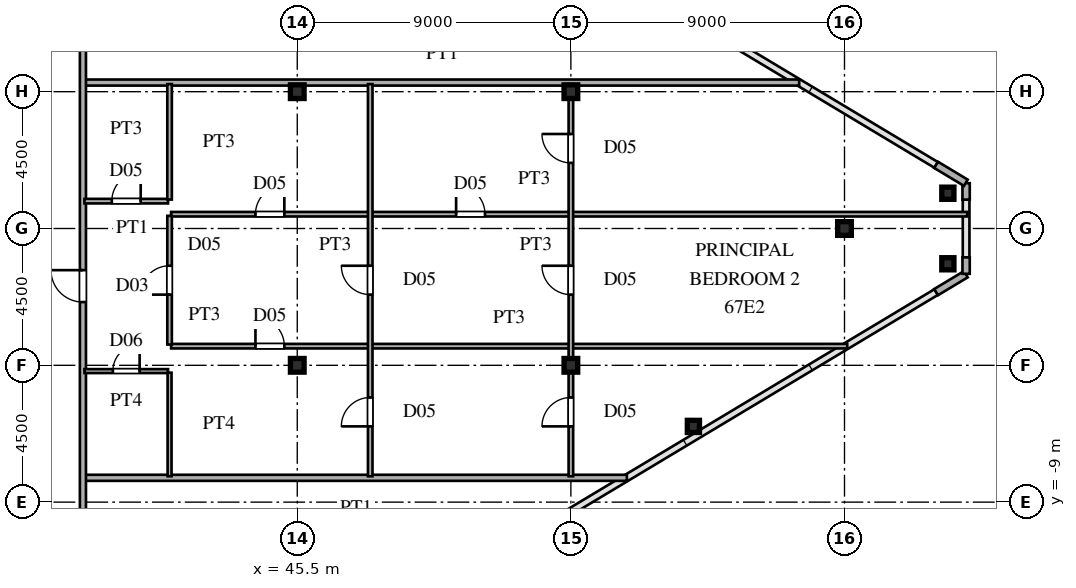
"""IFC4 building model, lengths in metres.
Left out: names, types, materials, properties, quantities, classifications, styles, units other than length and angle.
Written with IfcOpenShell. Run it as: python <this file> out.ifc"""

import sys

from ifc_helpers import new_model, si_unit, direction, frame, frame_2d, origin, origin_2d, place, context, subcontext, project, spatial, rectangle, hollow_rectangle, i_section, extrude, source, transform, mapped, element, fill, save


model = new_model("IFC4")
c1 = context("Model", 3, precision=1e-05, world=origin(), true_north=direction((0.0, 1.0)))
c2 = subcontext(c1, "Body", "Model", "MODEL_VIEW")
j1 = project(units=[si_unit("LENGTHUNIT", "METRE"), si_unit("PLANEANGLEUNIT", "RADIAN")], contexts=[c1])
p1 = place(None, origin())
s1 = spatial("IfcSite", under=j1, at=p1, CompositionType="ELEMENT")
p2 = place(p1, origin())
s2 = spatial("IfcBuilding", under=s1, at=p2, CompositionType="ELEMENT")
p3 = place(p2, frame((0.0, 0.0, 254.4)))
s3 = spatial("IfcBuildingStorey", under=s2, at=p3, CompositionType="ELEMENT", Elevation=254.4)
m1 = source(origin(), c2, "Body", "SweptSolid", [
    extrude(i_section(OverallWidth=0.45, OverallDepth=0.45, WebThickness=0.016, FlangeThickness=0.025, at=origin_2d()), origin(), (0.0, 0.0, 1.0), 3.75),
])
for number, where, z_axis, x_axis in (
    (1, (45.5, -4.5, 0.0), (0.0, 0.0, 1.0), (1.0, 0.0, 0.0)),
    (2, (45.5, 4.5, 0.0), (0.0, 0.0, 1.0), (1.0, 0.0, 0.0)),
    (3, (54.5, -4.5, 0.0), (0.0, 0.0, 1.0), (1.0, 0.0, 0.0)),
    (4, (54.5, 4.5, 0.0), (0.0, 0.0, 1.0), (1.0, 0.0, 0.0)),
    (5, (63.5, 0.0, 0.0), (0.0, 0.0, 1.0), (1.0, 0.0, 0.0)),
):
    element("IfcColumn", number, at=place(p3, frame(where, z_axis=z_axis, x_axis=x_axis)), inside=s3, PredefinedType="COLUMN", context=c2, shape_type="MappedRepresentation", body=[
        mapped(m1, transform((0.0, 0.0, 0.0), scale=1.0)),
    ])
m2 = source(origin(), c2, "Body", "SweptSolid", [
    extrude(hollow_rectangle(XDim=0.4, YDim=0.4, WallThickness=0.016, at=origin_2d()), origin(), (0.0, 0.0, 1.0), 3.75),
])
for number, where, z_axis, x_axis in (
    (6, (66.9, -1.16, 0.0), (0.0, 0.0, 1.0), (1.0, 0.0, 0.0)),
    (7, (66.9, 1.16, 0.0), (0.0, 0.0, 1.0), (1.0, 0.0, 0.0)),
    (8, (58.53, -6.509, 0.0), (0.0, 0.0, 1.0), (1.0, 0.0, 0.0)),
):
    element("IfcColumn", number, at=place(p3, frame(where, z_axis=z_axis, x_axis=x_axis)), inside=s3, PredefinedType="COLUMN", context=c2, shape_type="MappedRepresentation", body=[
        mapped(m2, transform((0.0, 0.0, 0.0), scale=1.0)),
    ])
p4 = place(p3, frame((66.514, -2.092, 0.0), z_axis=(0.0, 0.0, 1.0), x_axis=(0.85743623509, 0.514590228002, 0.0)))
e9 = element("IfcWall", 9, at=p4, inside=s3, PredefinedType="SOLIDWALL", context=c2, shape_type="SweptSolid", body=[
    extrude(rectangle(XDim=1.14, YDim=0.24, at=frame_2d((0.57, 0.0))), origin(), (0.0, 0.0, 1.0), 3.53),
])
for number, where, z_axis, x_axis in (
    (10, (67.5, -1.49, 0.0), (0.0, 0.0, 1.0), (0.0, 1.0, 0.0)),
    (11, (67.5, 0.95, 0.0), (0.0, 0.0, 1.0), (0.0, 1.0, 0.0)),
):
    element("IfcWall", number, at=place(p3, frame(where, z_axis=z_axis, x_axis=x_axis)), inside=s3, PredefinedType="SOLIDWALL", context=c2, shape_type="SweptSolid", body=[
        extrude(rectangle(XDim=0.54, YDim=0.24, at=frame_2d((0.27, 0.0))), origin(), (0.0, 0.0, 1.0), 3.53),
    ])
p5 = place(p3, frame((67.491, 1.505, 0.0), z_axis=(0.0, 0.0, 1.0), x_axis=(-0.85743623509, 0.514590228002, 0.0)))
e12 = element("IfcWall", 12, at=p5, inside=s3, PredefinedType="SOLIDWALL", context=c2, shape_type="SweptSolid", body=[
    extrude(rectangle(XDim=1.14, YDim=0.24, at=frame_2d((0.57, 0.0))), origin(), (0.0, 0.0, 1.0), 3.53),
])
p6 = place(p3, frame((38.53, -8.2, 0.0), z_axis=(0.0, 0.0, 1.0), x_axis=(1.0, 0.0, 0.0)))
e13 = element("IfcWall", 13, at=p6, inside=s3, PredefinedType="PARTITIONING", context=c2, shape_type="SweptSolid", body=[
    extrude(rectangle(XDim=17.813, YDim=0.2, at=frame_2d((8.906, 0.0))), origin(), (0.0, 0.0, 1.0), 3.53),
])
p7 = place(p3, frame((38.5, -4.69, 0.0), z_axis=(0.0, 0.0, 1.0), x_axis=(1.0, 0.0, 0.0)))
e14 = element("IfcWall", 14, at=p7, inside=s3, PredefinedType="PARTITIONING", context=c2, shape_type="SweptSolid", body=[
    extrude(rectangle(XDim=2.75, YDim=0.13, at=frame_2d((1.375, 0.0))), origin(), (0.0, 0.0, 1.0), 3.53),
])
p8 = place(p7, frame((0.935, 0.0, 0.0)))
e15 = element("IfcOpeningElement", 15, at=p8, cuts=e14, PredefinedType="OPENING", context=c2, shape_type="SweptSolid", body=[
    extrude(rectangle(XDim=0.88, YDim=2.1, at=frame_2d((0.44, 1.05))), frame((0.0, 0.075, 0.0), z_axis=(0.0, -1.0, 0.0), x_axis=(1.0, 0.0, 0.0)), (0.0, 0.0, 1.0), 0.15),
])
p9 = place(p3, frame((41.35, -3.87, 0.0), z_axis=(0.0, 0.0, 1.0), x_axis=(1.0, 0.0, 0.0)))
e16 = element("IfcWall", 16, at=p9, inside=s3, PredefinedType="PARTITIONING", context=c2, shape_type="SweptSolid", body=[
    extrude(rectangle(XDim=22.24, YDim=0.15, at=frame_2d((11.12, 0.0))), origin(), (0.0, 0.0, 1.0), 3.53),
])
p10 = place(p9, frame((2.775, 0.0, 0.0)))
e17 = element("IfcOpeningElement", 17, at=p10, cuts=e16, PredefinedType="OPENING", context=c2, shape_type="SweptSolid", body=[
    extrude(rectangle(XDim=0.95, YDim=2.15, at=frame_2d((0.475, 1.075))), frame((0.0, 0.085, 0.0), z_axis=(0.0, -1.0, 0.0), x_axis=(1.0, 0.0, 0.0)), (0.0, 0.0, 1.0), 0.17),
])
p11 = place(p3, frame((41.35, 0.47, 0.0), z_axis=(0.0, 0.0, 1.0), x_axis=(1.0, 0.0, 0.0)))
e18 = element("IfcWall", 18, at=p11, inside=s3, PredefinedType="PARTITIONING", context=c2, shape_type="SweptSolid", body=[
    extrude(rectangle(XDim=26.185, YDim=0.15, at=frame_2d((13.092, 0.0))), origin(), (0.0, 0.0, 1.0), 3.53),
])
p12 = place(p11, frame((2.775, 0.0, 0.0)))
e19 = element("IfcOpeningElement", 19, at=p12, cuts=e18, PredefinedType="OPENING", context=c2, shape_type="SweptSolid", body=[
    extrude(rectangle(XDim=0.95, YDim=2.15, at=frame_2d((0.475, 1.075))), frame((0.0, 0.085, 0.0), z_axis=(0.0, -1.0, 0.0), x_axis=(1.0, 0.0, 0.0)), (0.0, 0.0, 1.0), 0.17),
])
p13 = place(p11, frame((9.375, 0.0, 0.0)))
e20 = element("IfcOpeningElement", 20, at=p13, cuts=e18, PredefinedType="OPENING", context=c2, shape_type="SweptSolid", body=[
    extrude(rectangle(XDim=0.95, YDim=2.15, at=frame_2d((0.475, 1.075))), frame((0.0, 0.085, 0.0), z_axis=(0.0, -1.0, 0.0), x_axis=(1.0, 0.0, 0.0)), (0.0, 0.0, 1.0), 0.17),
])
p14 = place(p3, frame((38.5, 0.9, 0.0), z_axis=(0.0, 0.0, 1.0), x_axis=(1.0, 0.0, 0.0)))
e21 = element("IfcWall", 21, at=p14, inside=s3, PredefinedType="PARTITIONING", context=c2, shape_type="SweptSolid", body=[
    extrude(rectangle(XDim=2.75, YDim=0.15, at=frame_2d((1.375, 0.0))), origin(), (0.0, 0.0, 1.0), 3.53),
])
p15 = place(p14, frame((0.9, 0.0, 0.0)))
e22 = element("IfcOpeningElement", 22, at=p15, cuts=e21, PredefinedType="OPENING", context=c2, shape_type="SweptSolid", body=[
    extrude(rectangle(XDim=0.95, YDim=2.15, at=frame_2d((0.475, 1.075))), frame((0.0, 0.085, 0.0), z_axis=(0.0, -1.0, 0.0), x_axis=(1.0, 0.0, 0.0)), (0.0, 0.0, 1.0), 0.17),
])
p16 = place(p3, frame((38.53, 4.8, 0.0), z_axis=(0.0, 0.0, 1.0), x_axis=(1.0, 0.0, 0.0)))
e23 = element("IfcWall", 23, at=p16, inside=s3, PredefinedType="PARTITIONING", context=c2, shape_type="SweptSolid", body=[
    extrude(rectangle(XDim=23.48, YDim=0.2, at=frame_2d((11.74, 0.0))), origin(), (0.0, 0.0, 1.0), 3.53),
])
p17 = place(p3, frame((38.45, -15.515, 0.0), z_axis=(0.0, 0.0, 1.0), x_axis=(0.0, 1.0, 0.0)))
e24 = element("IfcWall", 24, at=p17, inside=s3, PredefinedType="PARTITIONING", context=c2, shape_type="SweptSolid", body=[
    extrude(rectangle(XDim=31.03, YDim=0.2, at=frame_2d((15.515, 0.0))), origin(), (0.0, 0.0, 1.0), 3.53),
])
p18 = place(p17, frame((3.09, 0.0, 0.0)))
e25 = element("IfcOpeningElement", 25, at=p18, cuts=e24, PredefinedType="OPENING", context=c2, shape_type="SweptSolid", body=[
    extrude(rectangle(XDim=1.05, YDim=2.25, at=frame_2d((0.525, 1.125))), frame((0.0, 0.11, 0.0), z_axis=(0.0, -1.0, 0.0), x_axis=(1.0, 0.0, 0.0)), (0.0, 0.0, 1.0), 0.22),
])
p19 = place(p17, frame((13.095, 0.0, 0.0)))
e26 = element("IfcOpeningElement", 26, at=p19, cuts=e24, PredefinedType="OPENING", context=c2, shape_type="SweptSolid", body=[
    extrude(rectangle(XDim=1.05, YDim=2.25, at=frame_2d((0.525, 1.125))), frame((0.0, 0.11, 0.0), z_axis=(0.0, -1.0, 0.0), x_axis=(1.0, 0.0, 0.0)), (0.0, 0.0, 1.0), 0.22),
])
p20 = place(p17, frame((25.19, 0.0, 0.0)))
e27 = element("IfcOpeningElement", 27, at=p20, cuts=e24, PredefinedType="OPENING", context=c2, shape_type="SweptSolid", body=[
    extrude(rectangle(XDim=1.05, YDim=2.25, at=frame_2d((0.525, 1.125))), frame((0.0, 0.11, 0.0), z_axis=(0.0, -1.0, 0.0), x_axis=(1.0, 0.0, 0.0)), (0.0, 0.0, 1.0), 0.22),
])
p21 = place(p3, frame((41.3, -8.15, 0.0), z_axis=(0.0, 0.0, 1.0), x_axis=(0.0, 1.0, 0.0)))
e28 = element("IfcWall", 28, at=p21, inside=s3, PredefinedType="PARTITIONING", context=c2, shape_type="SweptSolid", body=[
    extrude(rectangle(XDim=3.408, YDim=0.13, at=frame_2d((1.704, 0.0))), origin(), (0.0, 0.0, 1.0), 3.53),
])
p22 = place(p3, frame((41.3, -3.817, 0.0), z_axis=(0.0, 0.0, 1.0), x_axis=(0.0, 1.0, 0.0)))
e29 = element("IfcWall", 29, at=p22, inside=s3, PredefinedType="PARTITIONING", context=c2, shape_type="SweptSolid", body=[
    extrude(rectangle(XDim=4.234, YDim=0.15, at=frame_2d((2.117, 0.0))), origin(), (0.0, 0.0, 1.0), 3.53),
])
p23 = place(p22, frame((1.642, 0.0, 0.0)))
e30 = element("IfcOpeningElement", 30, at=p23, cuts=e29, PredefinedType="OPENING", context=c2, shape_type="SweptSolid", body=[
    extrude(rectangle(XDim=0.95, YDim=2.15, at=frame_2d((0.475, 1.075))), frame((0.0, 0.085, 0.0), z_axis=(0.0, -1.0, 0.0), x_axis=(1.0, 0.0, 0.0)), (0.0, 0.0, 1.0), 0.17),
])
p24 = place(p3, frame((41.3, 0.952, 0.0), z_axis=(0.0, 0.0, 1.0), x_axis=(0.0, 1.0, 0.0)))
e31 = element("IfcWall", 31, at=p24, inside=s3, PredefinedType="PARTITIONING", context=c2, shape_type="SweptSolid", body=[
    extrude(rectangle(XDim=3.798, YDim=0.15, at=frame_2d((1.899, 0.0))), origin(), (0.0, 0.0, 1.0), 3.53),
])
p25 = place(p3, frame((47.9, -8.15, 0.0), z_axis=(0.0, 0.0, 1.0), x_axis=(0.0, 1.0, 0.0)))
e32 = element("IfcWall", 32, at=p25, inside=s3, PredefinedType="PARTITIONING", context=c2, shape_type="SweptSolid", body=[
    extrude(rectangle(XDim=12.9, YDim=0.15, at=frame_2d((6.45, 0.0))), origin(), (0.0, 0.0, 1.0), 3.53),
])
p26 = place(p25, frame((5.975, 0.0, 0.0)))
e33 = element("IfcOpeningElement", 33, at=p26, cuts=e32, PredefinedType="OPENING", context=c2, shape_type="SweptSolid", body=[
    extrude(rectangle(XDim=0.95, YDim=2.15, at=frame_2d((0.475, 1.075))), frame((0.0, 0.085, 0.0), z_axis=(0.0, -1.0, 0.0), x_axis=(1.0, 0.0, 0.0)), (0.0, 0.0, 1.0), 0.17),
])
p27 = place(p25, frame((1.642, 0.0, 0.0)))
e34 = element("IfcOpeningElement", 34, at=p27, cuts=e32, PredefinedType="OPENING", context=c2, shape_type="SweptSolid", body=[
    extrude(rectangle(XDim=0.95, YDim=2.15, at=frame_2d((0.475, 1.075))), frame((0.0, 0.085, 0.0), z_axis=(0.0, -1.0, 0.0), x_axis=(1.0, 0.0, 0.0)), (0.0, 0.0, 1.0), 0.17),
])
p28 = place(p3, frame((54.5, -8.15, 0.0), z_axis=(0.0, 0.0, 1.0), x_axis=(0.0, 1.0, 0.0)))
e35 = element("IfcWall", 35, at=p28, inside=s3, PredefinedType="PARTITIONING", context=c2, shape_type="SweptSolid", body=[
    extrude(rectangle(XDim=12.9, YDim=0.15, at=frame_2d((6.45, 0.0))), origin(), (0.0, 0.0, 1.0), 2.93),
])
p29 = place(p28, frame((5.975, 0.0, 0.0)))
e36 = element("IfcOpeningElement", 36, at=p29, cuts=e35, PredefinedType="OPENING", context=c2, shape_type="SweptSolid", body=[
    extrude(rectangle(XDim=0.95, YDim=2.15, at=frame_2d((0.475, 1.075))), frame((0.0, 0.085, 0.0), z_axis=(0.0, -1.0, 0.0), x_axis=(1.0, 0.0, 0.0)), (0.0, 0.0, 1.0), 0.17),
])
p30 = place(p28, frame((1.642, 0.0, 0.0)))
e37 = element("IfcOpeningElement", 37, at=p30, cuts=e35, PredefinedType="OPENING", context=c2, shape_type="SweptSolid", body=[
    extrude(rectangle(XDim=0.95, YDim=2.15, at=frame_2d((0.475, 1.075))), frame((0.0, 0.085, 0.0), z_axis=(0.0, -1.0, 0.0), x_axis=(1.0, 0.0, 0.0)), (0.0, 0.0, 1.0), 0.17),
])
p31 = place(p28, frame((10.308, 0.0, 0.0)))
e38 = element("IfcOpeningElement", 38, at=p31, cuts=e35, PredefinedType="OPENING", context=c2, shape_type="SweptSolid", body=[
    extrude(rectangle(XDim=0.95, YDim=2.15, at=frame_2d((0.475, 1.075))), frame((0.0, 0.085, 0.0), z_axis=(0.0, -1.0, 0.0), x_axis=(1.0, 0.0, 0.0)), (0.0, 0.0, 1.0), 0.17),
])
m3 = source(origin(), c2, "Body", "SweptSolid", [
    extrude(rectangle(XDim=0.88, YDim=2.1, at=frame_2d((0.44, 1.05))), frame((0.0, 0.025, 0.0), z_axis=(0.0, -1.0, 0.0), x_axis=(1.0, 0.0, 0.0)), (0.0, 0.0, 1.0), 0.05),
])
p32 = place(p8, origin())
e39 = element("IfcDoor", 39, at=p32, inside=s3, OperationType="SINGLE_SWING_RIGHT", PredefinedType="DOOR", context=c2, shape_type="MappedRepresentation", body=[
    mapped(m3, transform((0.0, 0.0, 0.0), scale=1.0)),
])
fill(e15, e39)
m4 = source(origin(), c2, "Body", "SweptSolid", [
    extrude(rectangle(XDim=0.95, YDim=2.15, at=frame_2d((0.475, 1.075))), frame((0.0, 0.025, 0.0), z_axis=(0.0, -1.0, 0.0), x_axis=(1.0, 0.0, 0.0)), (0.0, 0.0, 1.0), 0.05),
])
p33 = place(p10, origin())
e40 = element("IfcDoor", 40, at=p33, inside=s3, OperationType="SINGLE_SWING_LEFT", PredefinedType="DOOR", context=c2, shape_type="MappedRepresentation", body=[
    mapped(m4, transform((0.0, 0.0, 0.0), scale=1.0)),
])
fill(e17, e40)
p34 = place(p12, origin())
e41 = element("IfcDoor", 41, at=p34, inside=s3, OperationType="SINGLE_SWING_RIGHT", PredefinedType="DOOR", context=c2, shape_type="MappedRepresentation", body=[
    mapped(m4, transform((0.0, 0.0, 0.0), scale=1.0)),
])
fill(e19, e41)
p35 = place(p13, origin())
e42 = element("IfcDoor", 42, at=p35, inside=s3, OperationType="SINGLE_SWING_LEFT", PredefinedType="DOOR", context=c2, shape_type="MappedRepresentation", body=[
    mapped(m4, transform((0.0, 0.0, 0.0), scale=1.0)),
])
fill(e20, e42)
p36 = place(p15, origin())
e43 = element("IfcDoor", 43, at=p36, inside=s3, OperationType="SINGLE_SWING_RIGHT", PredefinedType="DOOR", context=c2, shape_type="MappedRepresentation", body=[
    mapped(m4, transform((0.0, 0.0, 0.0), scale=1.0)),
])
fill(e22, e43)
m5 = source(origin(), c2, "Body", "SweptSolid", [
    extrude(rectangle(XDim=1.05, YDim=2.25, at=frame_2d((0.525, 1.125))), frame((0.0, 0.025, 0.0), z_axis=(0.0, -1.0, 0.0), x_axis=(1.0, 0.0, 0.0)), (0.0, 0.0, 1.0), 0.05),
])
p37 = place(p19, origin())
e44 = element("IfcDoor", 44, at=p37, inside=s3, OperationType="SINGLE_SWING_RIGHT", PredefinedType="DOOR", context=c2, shape_type="MappedRepresentation", body=[
    mapped(m5, transform((0.0, 0.0, 0.0), scale=1.0)),
])
fill(e26, e44)
p38 = place(p23, origin())
e45 = element("IfcDoor", 45, at=p38, inside=s3, OperationType="SINGLE_SWING_LEFT", PredefinedType="DOOR", context=c2, shape_type="MappedRepresentation", body=[
    mapped(m4, transform((0.0, 0.0, 0.0), scale=1.0)),
])
fill(e30, e45)
p39 = place(p26, origin())
e46 = element("IfcDoor", 46, at=p39, inside=s3, OperationType="SINGLE_SWING_RIGHT", PredefinedType="DOOR", context=c2, shape_type="MappedRepresentation", body=[
    mapped(m4, transform((0.0, 0.0, 0.0), scale=1.0)),
])
fill(e33, e46)
p40 = place(p27, origin())
e47 = element("IfcDoor", 47, at=p40, inside=s3, OperationType="SINGLE_SWING_LEFT", PredefinedType="DOOR", context=c2, shape_type="MappedRepresentation", body=[
    mapped(m4, transform((0.0, 0.0, 0.0), scale=1.0)),
])
fill(e34, e47)
p41 = place(p29, origin())
e48 = element("IfcDoor", 48, at=p41, inside=s3, OperationType="SINGLE_SWING_RIGHT", PredefinedType="DOOR", context=c2, shape_type="MappedRepresentation", body=[
    mapped(m4, transform((0.0, 0.0, 0.0), scale=1.0)),
])
fill(e36, e48)
p42 = place(p30, origin())
e49 = element("IfcDoor", 49, at=p42, inside=s3, OperationType="SINGLE_SWING_LEFT", PredefinedType="DOOR", context=c2, shape_type="MappedRepresentation", body=[
    mapped(m4, transform((0.0, 0.0, 0.0), scale=1.0)),
])
fill(e37, e49)
p43 = place(p31, origin())
e50 = element("IfcDoor", 50, at=p43, inside=s3, OperationType="SINGLE_SWING_RIGHT", PredefinedType="DOOR", context=c2, shape_type="MappedRepresentation", body=[
    mapped(m4, transform((0.0, 0.0, 0.0), scale=1.0)),
])
fill(e38, e50)
save(model, sys.argv[1])
